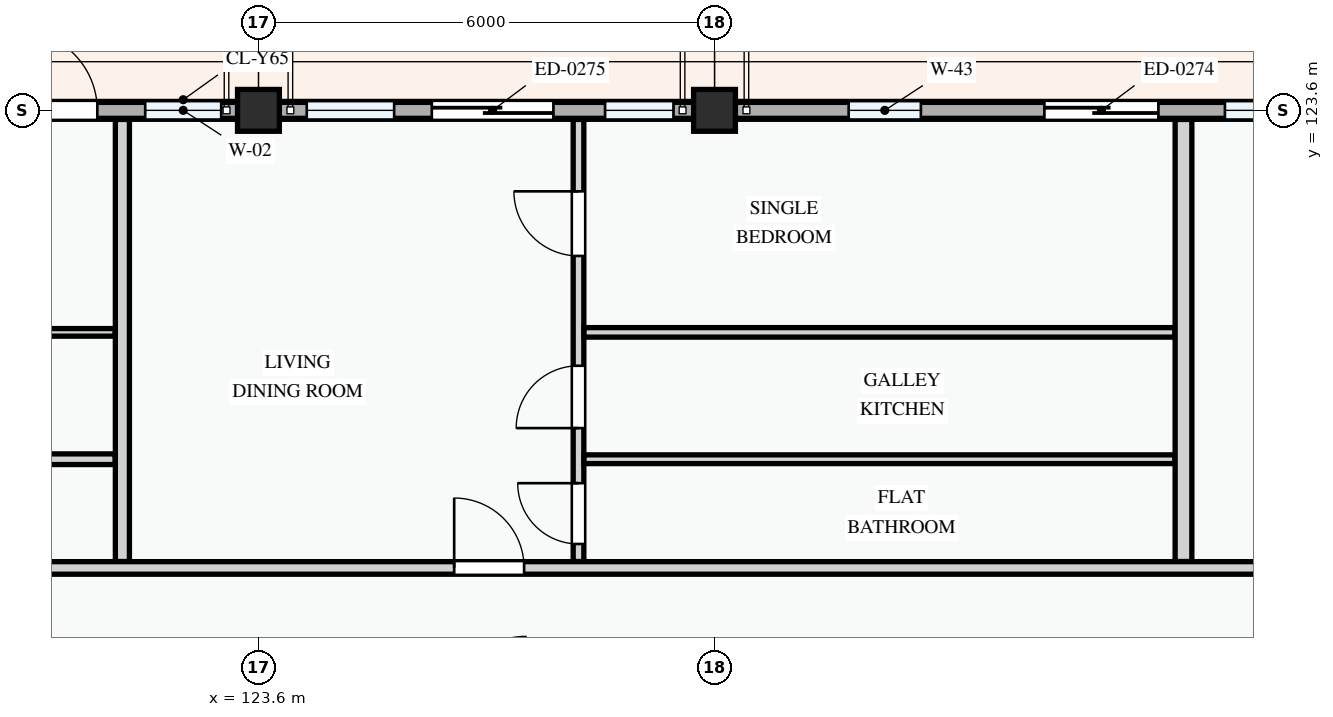
"""IFC4 building model, lengths in metres.
Left out: names, types, materials, properties, quantities, classifications, styles, units other than length and angle.
Written with IfcOpenShell. Run it as: python <this file> out.ifc"""

import sys

from ifc_helpers import new_model, si_unit, direction, frame, frame_2d, origin, origin_2d, place, context, subcontext, project, spatial, polyline, rectangle, outline, extrude, element, fill, save


model = new_model("IFC4")
c1 = context("Model", 3, precision=1e-05, world=origin(), true_north=direction((0.0, 1.0)))
c2 = subcontext(c1, "Body", "Model", "MODEL_VIEW")
j1 = project(units=[si_unit("LENGTHUNIT", "METRE"), si_unit("PLANEANGLEUNIT", "RADIAN")], contexts=[c1])
p1 = place(None, origin())
s1 = spatial("IfcSite", under=j1, at=p1, CompositionType="ELEMENT")
p2 = place(p1, origin())
s2 = spatial("IfcBuilding", under=s1, at=p2, CompositionType="ELEMENT")
p3 = place(p2, frame((0.0, 0.0, 41.1)))
s3 = spatial("IfcBuildingStorey", under=s2, at=p3, CompositionType="ELEMENT", Elevation=41.1)
for number, where, z_axis, x_axis in (
    (1, (123.6, 123.6, 0.0), (0.0, 0.0, 1.0), (1.0, 0.0, 0.0)),
    (2, (129.6, 123.6, 0.0), (0.0, 0.0, 1.0), (1.0, 0.0, 0.0)),
):
    element("IfcColumn", number, at=place(p3, frame(where, z_axis=z_axis, x_axis=x_axis)), inside=s3, PredefinedType="COLUMN", context=c2, shape_type="SweptSolid", body=[
        extrude(rectangle(XDim=0.55, YDim=0.55, at=origin_2d()), origin(), (0.0, 0.0, 1.0), 3.3),
    ])
p4 = place(p3, frame((138.0, 123.6, 0.0), z_axis=(0.0, 0.0, 1.0), x_axis=(-1.0, 0.0, 0.0)))
e3 = element("IfcWall", 3, at=p4, inside=s3, PredefinedType="STANDARD", context=c2, shape_type="SweptSolid", body=[
    extrude(rectangle(XDim=8.4, YDim=0.235, at=frame_2d((4.2, 0.0))), origin(), (0.0, 0.0, 1.0), 2.345),
])
p5 = place(p4, frame((2.56, 0.0, 0.0)))
e4 = element("IfcOpeningElement", 4, at=p5, cuts=e3, PredefinedType="OPENING", context=c2, shape_type="SweptSolid", body=[
    extrude(rectangle(XDim=1.5, YDim=2.2, at=frame_2d((0.75, 1.1))), frame((0.0, 0.127, 0.0), z_axis=(0.0, -1.0, 0.0), x_axis=(1.0, 0.0, 0.0)), (0.0, 0.0, 1.0), 0.255),
])
p6 = place(p4, frame((0.735, 0.0, 0.78)))
e5 = element("IfcOpeningElement", 5, at=p6, cuts=e3, PredefinedType="OPENING", context=c2, shape_type="SweptSolid", body=[
    extrude(rectangle(XDim=0.95, YDim=1.15, at=frame_2d((0.475, 0.575))), frame((0.0, 0.127, 0.0), z_axis=(0.0, -1.0, 0.0), x_axis=(1.0, 0.0, 0.0)), (0.0, 0.0, 1.0), 0.255),
])
p7 = place(p4, frame((5.685, 0.0, 0.78)))
e6 = element("IfcOpeningElement", 6, at=p7, cuts=e3, PredefinedType="OPENING", context=c2, shape_type="SweptSolid", body=[
    extrude(rectangle(XDim=0.95, YDim=1.15, at=frame_2d((0.475, 0.575))), frame((0.0, 0.127, 0.0), z_axis=(0.0, -1.0, 0.0), x_axis=(1.0, 0.0, 0.0)), (0.0, 0.0, 1.0), 0.255),
])
p8 = place(p3, frame((129.6, 123.6, 0.0), z_axis=(0.0, 0.0, 1.0), x_axis=(-1.0, 0.0, 0.0)))
e7 = element("IfcWall", 7, at=p8, inside=s3, PredefinedType="STANDARD", context=c2, shape_type="SweptSolid", body=[
    extrude(rectangle(XDim=6.0, YDim=0.235, at=frame_2d((3.0, 0.0))), origin(), (0.0, 0.0, 1.0), 2.445),
])
p9 = place(p8, frame((2.119, 0.0, 0.0)))
e8 = element("IfcOpeningElement", 8, at=p9, cuts=e7, PredefinedType="OPENING", context=c2, shape_type="SweptSolid", body=[
    extrude(rectangle(XDim=1.6, YDim=2.2, at=frame_2d((0.8, 1.1))), frame((0.0, 0.127, 0.0), z_axis=(0.0, -1.0, 0.0), x_axis=(1.0, 0.0, 0.0)), (0.0, 0.0, 1.0), 0.255),
])
p10 = place(p8, frame((0.54, 0.0, 0.78)))
e9 = element("IfcOpeningElement", 9, at=p10, cuts=e7, PredefinedType="OPENING", context=c2, shape_type="SweptSolid", body=[
    extrude(rectangle(XDim=0.9, YDim=1.2, at=frame_2d((0.45, 0.6))), frame((0.0, 0.127, 0.0), z_axis=(0.0, -1.0, 0.0), x_axis=(1.0, 0.0, 0.0)), (0.0, 0.0, 1.0), 0.255),
])
p11 = place(p8, frame((4.215, 0.0, 0.78)))
e10 = element("IfcOpeningElement", 10, at=p11, cuts=e7, PredefinedType="OPENING", context=c2, shape_type="SweptSolid", body=[
    extrude(rectangle(XDim=1.15, YDim=1.25, at=frame_2d((0.575, 0.625))), frame((0.0, 0.127, 0.0), z_axis=(0.0, -1.0, 0.0), x_axis=(1.0, 0.0, 0.0)), (0.0, 0.0, 1.0), 0.255),
])
p12 = place(p3, frame((123.6, 123.6, 0.0), z_axis=(0.0, 0.0, 1.0), x_axis=(-1.0, 0.0, 0.0)))
e11 = element("IfcWall", 11, at=p12, inside=s3, PredefinedType="STANDARD", context=c2, shape_type="SweptSolid", body=[
    extrude(rectangle(XDim=8.4, YDim=0.235, at=frame_2d((4.2, 0.0))), origin(), (0.0, 0.0, 1.0), 2.345),
])
p13 = place(p12, frame((2.12, 0.0, 0.0)))
e12 = element("IfcOpeningElement", 12, at=p13, cuts=e11, PredefinedType="OPENING", context=c2, shape_type="SweptSolid", body=[
    extrude(rectangle(XDim=1.05, YDim=2.15, at=frame_2d((0.525, 1.075))), frame((0.0, 0.127, 0.0), z_axis=(0.0, -1.0, 0.0), x_axis=(1.0, 0.0, 0.0)), (0.0, 0.0, 1.0), 0.255),
])
p14 = place(p12, frame((0.49, 0.0, 0.78)))
e13 = element("IfcOpeningElement", 13, at=p14, cuts=e11, PredefinedType="OPENING", context=c2, shape_type="SweptSolid", body=[
    extrude(rectangle(XDim=1.0, YDim=1.25, at=frame_2d((0.5, 0.625))), frame((0.0, 0.127, 0.0), z_axis=(0.0, -1.0, 0.0), x_axis=(1.0, 0.0, 0.0)), (0.0, 0.0, 1.0), 0.255),
])
p15 = place(p12, frame((4.343, 0.0, 0.78)))
e14 = element("IfcOpeningElement", 14, at=p15, cuts=e11, PredefinedType="OPENING", context=c2, shape_type="SweptSolid", body=[
    extrude(rectangle(XDim=1.15, YDim=1.25, at=frame_2d((0.575, 0.625))), frame((0.0, 0.127, 0.0), z_axis=(0.0, -1.0, 0.0), x_axis=(1.0, 0.0, 0.0)), (0.0, 0.0, 1.0), 0.255),
])
p16 = place(p12, frame((6.938, 0.0, 0.78)))
e15 = element("IfcOpeningElement", 15, at=p16, cuts=e11, PredefinedType="OPENING", context=c2, shape_type="SweptSolid", body=[
    extrude(rectangle(XDim=0.95, YDim=1.15, at=frame_2d((0.475, 0.575))), frame((0.0, 0.127, 0.0), z_axis=(0.0, -1.0, 0.0), x_axis=(1.0, 0.0, 0.0)), (0.0, 0.0, 1.0), 0.255),
])
p17 = place(p3, frame((138.0, 123.6, 3.3), z_axis=(0.0, 0.0, 1.0), x_axis=(-1.0, 0.0, 0.0)))
e16 = element("IfcWall", 16, at=p17, inside=s3, PredefinedType="PARAPET", context=c2, shape_type="SweptSolid", body=[
    extrude(outline(polyline([(0.0, 0.0), (8.4, 0.0), (8.4, 1.12), (7.7, 1.322), (7.0, 1.485), (6.3, 1.618), (5.6, 1.718), (4.9, 1.779), (4.2, 1.8), (3.5, 1.779), (2.8, 1.718), (2.1, 1.618), (1.4, 1.485), (0.7, 1.322), (0.0, 1.12), (0.0, 0.0)])), frame((0.0, 0.105, 0.0), z_axis=(0.0, -1.0, 0.0), x_axis=(1.0, 0.0, 0.0)), (0.0, 0.0, 1.0), 0.21),
])
p18 = place(p3, frame((129.6, 123.6, 3.3), z_axis=(0.0, 0.0, 1.0), x_axis=(-1.0, 0.0, 0.0)))
e17 = element("IfcWall", 17, at=p18, inside=s3, PredefinedType="PARAPET", context=c2, shape_type="SweptSolid", body=[
    extrude(outline(polyline([(0.0, 0.0), (6.0, 0.0), (6.0, 1.12), (5.5, 1.322), (5.0, 1.485), (4.5, 1.618), (4.0, 1.718), (3.5, 1.779), (3.0, 1.8), (2.5, 1.779), (2.0, 1.718), (1.5, 1.618), (1.0, 1.485), (0.5, 1.322), (0.0, 1.12), (0.0, 0.0)])), frame((0.0, 0.105, 0.0), z_axis=(0.0, -1.0, 0.0), x_axis=(1.0, 0.0, 0.0)), (0.0, 0.0, 1.0), 0.21),
])
p19 = place(p3, frame((123.6, 123.6, 3.3), z_axis=(0.0, 0.0, 1.0), x_axis=(-1.0, 0.0, 0.0)))
e18 = element("IfcWall", 18, at=p19, inside=s3, PredefinedType="PARAPET", context=c2, shape_type="SweptSolid", body=[
    extrude(outline(polyline([(0.0, 0.0), (8.4, 0.0), (8.4, 1.12), (7.7, 1.322), (7.0, 1.485), (6.3, 1.618), (5.6, 1.718), (4.9, 1.779), (4.2, 1.8), (3.5, 1.779), (2.8, 1.718), (2.1, 1.618), (1.4, 1.485), (0.7, 1.322), (0.0, 1.12), (0.0, 0.0)])), frame((0.0, 0.105, 0.0), z_axis=(0.0, -1.0, 0.0), x_axis=(1.0, 0.0, 0.0)), (0.0, 0.0, 1.0), 0.21),
])
p20 = place(p3, frame((117.043, 120.679, 0.0), z_axis=(0.0, 0.0, 1.0), x_axis=(1.0, 0.0, 0.0)))
e19 = element("IfcWall", 19, at=p20, inside=s3, PredefinedType="PARTITIONING", context=c2, shape_type="SweptSolid", body=[
    extrude(rectangle(XDim=4.672, YDim=0.1, at=frame_2d((2.336, 0.0))), origin(), (0.0, 0.0, 1.0), 3.0),
])
p21 = place(p3, frame((117.043, 119.01, 0.0), z_axis=(0.0, 0.0, 1.0), x_axis=(1.0, 0.0, 0.0)))
e20 = element("IfcWall", 20, at=p21, inside=s3, PredefinedType="PARTITIONING", context=c2, shape_type="SweptSolid", body=[
    extrude(rectangle(XDim=4.672, YDim=0.14, at=frame_2d((2.336, 0.0))), origin(), (0.0, 0.0, 1.0), 3.0),
])
p22 = place(p3, frame((127.811, 117.665, 0.0), z_axis=(0.0, 0.0, 1.0), x_axis=(0.0, 1.0, 0.0)))
e21 = element("IfcWall", 21, at=p22, inside=s3, PredefinedType="PARTITIONING", context=c2, shape_type="SweptSolid", body=[
    extrude(rectangle(XDim=5.816, YDim=0.14, at=frame_2d((2.908, 0.0))), origin(), (0.0, 0.0, 1.0), 3.0),
])
p23 = place(p22, frame((0.231, 0.0, 0.0)))
e22 = element("IfcOpeningElement", 22, at=p23, cuts=e21, PredefinedType="OPENING", context=c2, shape_type="SweptSolid", body=[
    extrude(rectangle(XDim=0.8, YDim=2.1, at=frame_2d((0.4, 1.05))), frame((0.0, 0.08, 0.0), z_axis=(0.0, -1.0, 0.0), x_axis=(1.0, 0.0, 0.0)), (0.0, 0.0, 1.0), 0.16),
])
p24 = place(p22, frame((1.755, 0.0, 0.0)))
e23 = element("IfcOpeningElement", 23, at=p24, cuts=e21, PredefinedType="OPENING", context=c2, shape_type="SweptSolid", body=[
    extrude(rectangle(XDim=0.82, YDim=2.08, at=frame_2d((0.41, 1.04))), frame((0.0, 0.08, 0.0), z_axis=(0.0, -1.0, 0.0), x_axis=(1.0, 0.0, 0.0)), (0.0, 0.0, 1.0), 0.16),
])
p25 = place(p22, frame((4.02, 0.0, 0.0)))
e24 = element("IfcOpeningElement", 24, at=p25, cuts=e21, PredefinedType="OPENING", context=c2, shape_type="SweptSolid", body=[
    extrude(rectangle(XDim=0.85, YDim=2.1, at=frame_2d((0.425, 1.05))), frame((0.0, 0.08, 0.0), z_axis=(0.0, -1.0, 0.0), x_axis=(1.0, 0.0, 0.0)), (0.0, 0.0, 1.0), 0.16),
])
p26 = place(p3, frame((127.883, 120.679, 0.0), z_axis=(0.0, 0.0, 1.0), x_axis=(1.0, 0.0, 0.0)))
e25 = element("IfcWall", 25, at=p26, inside=s3, PredefinedType="PARTITIONING", context=c2, shape_type="SweptSolid", body=[
    extrude(rectangle(XDim=7.775, YDim=0.125, at=frame_2d((3.888, 0.0))), origin(), (0.0, 0.0, 1.0), 3.0),
])
p27 = place(p3, frame((127.883, 119.01, 0.0), z_axis=(0.0, 0.0, 1.0), x_axis=(1.0, 0.0, 0.0)))
e26 = element("IfcWall", 26, at=p27, inside=s3, PredefinedType="PARTITIONING", context=c2, shape_type="SweptSolid", body=[
    extrude(rectangle(XDim=7.775, YDim=0.115, at=frame_2d((3.888, 0.0))), origin(), (0.0, 0.0, 1.0), 3.0),
])
p28 = place(p3, frame((121.81, 117.665, 0.0), z_axis=(0.0, 0.0, 1.0), x_axis=(0.0, 1.0, 0.0)))
e27 = element("IfcWall", 27, at=p28, inside=s3, PredefinedType="PARTITIONING", context=c2, shape_type="SweptSolid", body=[
    extrude(rectangle(XDim=5.816, YDim=0.185, at=frame_2d((2.908, 0.0))), origin(), (0.0, 0.0, 1.0), 3.0),
])
p29 = place(p3, frame((135.77, 117.665, 0.0), z_axis=(0.0, 0.0, 1.0), x_axis=(0.0, 1.0, 0.0)))
e28 = element("IfcWall", 28, at=p29, inside=s3, PredefinedType="PARTITIONING", context=c2, shape_type="SweptSolid", body=[
    extrude(rectangle(XDim=5.816, YDim=0.22, at=frame_2d((2.908, 0.0))), origin(), (0.0, 0.0, 1.0), 3.0),
])
p30 = place(p3, frame((109.32, 117.58, 0.0), z_axis=(0.0, 0.0, 1.0), x_axis=(1.0, 0.0, 0.0)))
e29 = element("IfcWall", 29, at=p30, inside=s3, PredefinedType="PARTITIONING", context=c2, shape_type="SweptSolid", body=[
    extrude(rectangle(XDim=43.22, YDim=0.165, at=frame_2d((21.61, 0.0))), origin(), (0.0, 0.0, 1.0), 3.0),
])
p31 = place(p30, frame((2.344, 0.0, 0.0)))
e30 = element("IfcOpeningElement", 30, at=p31, cuts=e29, PredefinedType="OPENING", context=c2, shape_type="SweptSolid", body=[
    extrude(rectangle(XDim=0.92, YDim=2.1, at=frame_2d((0.46, 1.05))), frame((0.0, 0.093, 0.0), z_axis=(0.0, -1.0, 0.0), x_axis=(1.0, 0.0, 0.0)), (0.0, 0.0, 1.0), 0.185),
])
p32 = place(p30, frame((16.856, 0.0, 0.0)))
e31 = element("IfcOpeningElement", 31, at=p32, cuts=e29, PredefinedType="OPENING", context=c2, shape_type="SweptSolid", body=[
    extrude(rectangle(XDim=0.92, YDim=2.1, at=frame_2d((0.46, 1.05))), frame((0.0, 0.093, 0.0), z_axis=(0.0, -1.0, 0.0), x_axis=(1.0, 0.0, 0.0)), (0.0, 0.0, 1.0), 0.185),
])
p33 = place(p30, frame((31.227, 0.0, 0.0)))
e32 = element("IfcOpeningElement", 32, at=p33, cuts=e29, PredefinedType="OPENING", context=c2, shape_type="SweptSolid", body=[
    extrude(rectangle(XDim=0.92, YDim=2.1, at=frame_2d((0.46, 1.05))), frame((0.0, 0.093, 0.0), z_axis=(0.0, -1.0, 0.0), x_axis=(1.0, 0.0, 0.0)), (0.0, 0.0, 1.0), 0.185),
])
p34 = place(p5, frame((1.5, 0.0, 0.0), z_axis=(0.0, 0.0, 1.0), x_axis=(-1.0, 0.0, 0.0)))
e33 = element("IfcDoor", 33, at=p34, inside=s3, OperationType="SLIDING_TO_RIGHT", PredefinedType="DOOR", context=c2, shape_type="SweptSolid", body=[
    extrude(rectangle(XDim=1.5, YDim=2.2, at=frame_2d((0.75, 1.1))), frame((0.0, 0.025, 0.0), z_axis=(0.0, -1.0, 0.0), x_axis=(1.0, 0.0, 0.0)), (0.0, 0.0, 1.0), 0.05),
])
fill(e4, e33)
p35 = place(p6, origin())
e34 = element("IfcWindow", 34, at=p35, inside=s3, PartitioningType="SINGLE_PANEL", PredefinedType="WINDOW", context=c2, shape_type="SweptSolid", body=[
    extrude(rectangle(XDim=0.95, YDim=1.15, at=frame_2d((0.475, 0.575))), frame((0.0, 0.03, 0.0), z_axis=(0.0, -1.0, 0.0), x_axis=(1.0, 0.0, 0.0)), (0.0, 0.0, 1.0), 0.06),
])
fill(e5, e34)
p36 = place(p7, origin())
e35 = element("IfcWindow", 35, at=p36, inside=s3, PartitioningType="SINGLE_PANEL", PredefinedType="WINDOW", context=c2, shape_type="SweptSolid", body=[
    extrude(rectangle(XDim=0.95, YDim=1.15, at=frame_2d((0.475, 0.575))), frame((0.0, 0.03, 0.0), z_axis=(0.0, -1.0, 0.0), x_axis=(1.0, 0.0, 0.0)), (0.0, 0.0, 1.0), 0.06),
])
fill(e6, e35)
p37 = place(p9, frame((1.6, 0.0, 0.0), z_axis=(0.0, 0.0, 1.0), x_axis=(-1.0, 0.0, 0.0)))
e36 = element("IfcDoor", 36, at=p37, inside=s3, OperationType="SLIDING_TO_LEFT", PredefinedType="DOOR", context=c2, shape_type="SweptSolid", body=[
    extrude(rectangle(XDim=1.6, YDim=2.2, at=frame_2d((0.8, 1.1))), frame((0.0, 0.025, 0.0), z_axis=(0.0, -1.0, 0.0), x_axis=(1.0, 0.0, 0.0)), (0.0, 0.0, 1.0), 0.05),
])
fill(e8, e36)
p38 = place(p10, origin())
e37 = element("IfcWindow", 37, at=p38, inside=s3, PartitioningType="SINGLE_PANEL", PredefinedType="WINDOW", context=c2, shape_type="SweptSolid", body=[
    extrude(rectangle(XDim=0.9, YDim=1.2, at=frame_2d((0.45, 0.6))), frame((0.0, 0.03, 0.0), z_axis=(0.0, -1.0, 0.0), x_axis=(1.0, 0.0, 0.0)), (0.0, 0.0, 1.0), 0.06),
])
fill(e9, e37)
p39 = place(p11, origin())
e38 = element("IfcWindow", 38, at=p39, inside=s3, PartitioningType="SINGLE_PANEL", PredefinedType="WINDOW", context=c2, shape_type="SweptSolid", body=[
    extrude(rectangle(XDim=1.15, YDim=1.25, at=frame_2d((0.575, 0.625))), frame((0.0, 0.03, 0.0), z_axis=(0.0, -1.0, 0.0), x_axis=(1.0, 0.0, 0.0)), (0.0, 0.0, 1.0), 0.06),
])
fill(e10, e38)
p40 = place(p13, frame((1.05, 0.0, 0.0), z_axis=(0.0, 0.0, 1.0), x_axis=(-1.0, 0.0, 0.0)))
e39 = element("IfcDoor", 39, at=p40, inside=s3, OperationType="SINGLE_SWING_LEFT", PredefinedType="DOOR", context=c2, shape_type="SweptSolid", body=[
    extrude(rectangle(XDim=1.05, YDim=2.15, at=frame_2d((0.525, 1.075))), frame((0.0, 0.025, 0.0), z_axis=(0.0, -1.0, 0.0), x_axis=(1.0, 0.0, 0.0)), (0.0, 0.0, 1.0), 0.05),
])
fill(e12, e39)
p41 = place(p14, origin())
e40 = element("IfcWindow", 40, at=p41, inside=s3, PartitioningType="SINGLE_PANEL", PredefinedType="WINDOW", context=c2, shape_type="SweptSolid", body=[
    extrude(rectangle(XDim=1.0, YDim=1.25, at=frame_2d((0.5, 0.625))), frame((0.0, 0.03, 0.0), z_axis=(0.0, -1.0, 0.0), x_axis=(1.0, 0.0, 0.0)), (0.0, 0.0, 1.0), 0.06),
])
fill(e13, e40)
p42 = place(p23, origin())
e41 = element("IfcDoor", 41, at=p42, inside=s3, OperationType="SINGLE_SWING_RIGHT", PredefinedType="DOOR", context=c2, shape_type="SweptSolid", body=[
    extrude(rectangle(XDim=0.8, YDim=2.1, at=frame_2d((0.4, 1.05))), frame((0.0, 0.025, 0.0), z_axis=(0.0, -1.0, 0.0), x_axis=(1.0, 0.0, 0.0)), (0.0, 0.0, 1.0), 0.05),
])
fill(e22, e41)
p43 = place(p24, origin())
e42 = element("IfcDoor", 42, at=p43, inside=s3, OperationType="SINGLE_SWING_LEFT", PredefinedType="DOOR", context=c2, shape_type="SweptSolid", body=[
    extrude(rectangle(XDim=0.82, YDim=2.08, at=frame_2d((0.41, 1.04))), frame((0.0, 0.025, 0.0), z_axis=(0.0, -1.0, 0.0), x_axis=(1.0, 0.0, 0.0)), (0.0, 0.0, 1.0), 0.05),
])
fill(e23, e42)
p44 = place(p25, origin())
e43 = element("IfcDoor", 43, at=p44, inside=s3, OperationType="SINGLE_SWING_RIGHT", PredefinedType="DOOR", context=c2, shape_type="SweptSolid", body=[
    extrude(rectangle(XDim=0.85, YDim=2.1, at=frame_2d((0.425, 1.05))), frame((0.0, 0.025, 0.0), z_axis=(0.0, -1.0, 0.0), x_axis=(1.0, 0.0, 0.0)), (0.0, 0.0, 1.0), 0.05),
])
fill(e24, e43)
p45 = place(p32, origin())
e44 = element("IfcDoor", 44, at=p45, inside=s3, OperationType="SINGLE_SWING_LEFT", PredefinedType="DOOR", context=c2, shape_type="SweptSolid", body=[
    extrude(rectangle(XDim=0.92, YDim=2.1, at=frame_2d((0.46, 1.05))), frame((0.0, 0.025, 0.0), z_axis=(0.0, -1.0, 0.0), x_axis=(1.0, 0.0, 0.0)), (0.0, 0.0, 1.0), 0.05),
])
fill(e31, e44)
save(model, sys.argv[1])
